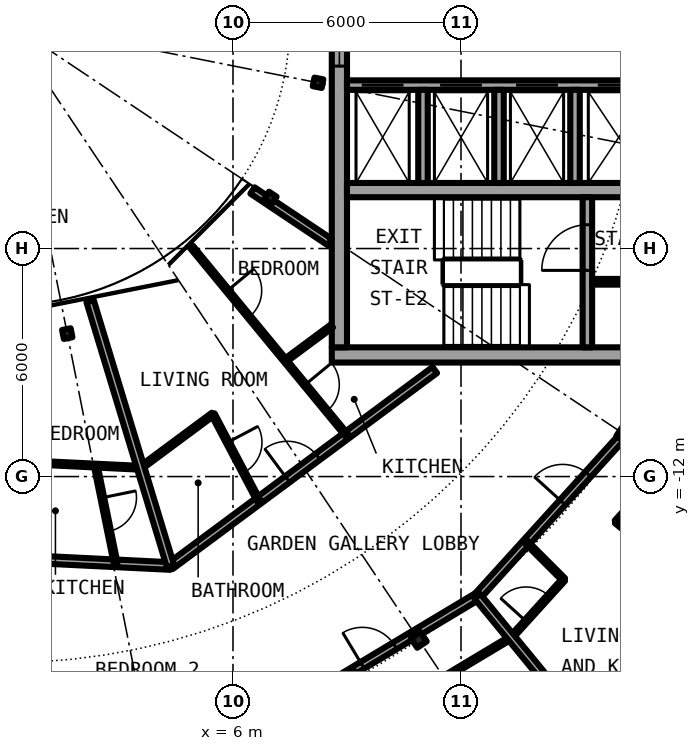
"""IFC4 building model, lengths in metres.
Left out: names, types, materials, properties, quantities, classifications, styles, units other than length and angle.
Written with IfcOpenShell. Run it as: python <this file> out.ifc"""

import sys

from ifc_helpers import new_model, si_unit, direction, frame, frame_2d, origin, origin_2d, place, context, subcontext, project, spatial, rectangle, i_section, extrude, element, fill, save


model = new_model("IFC4")
c1 = context("Model", 3, precision=1e-05, world=origin(), true_north=direction((0.0, 1.0)))
c2 = subcontext(c1, "Body", "Model", "MODEL_VIEW")
j1 = project(units=[si_unit("LENGTHUNIT", "METRE"), si_unit("PLANEANGLEUNIT", "RADIAN")], contexts=[c1])
p1 = place(None, origin())
s1 = spatial("IfcSite", under=j1, at=p1, CompositionType="ELEMENT")
p2 = place(p1, origin())
s2 = spatial("IfcBuilding", under=s1, at=p2, CompositionType="ELEMENT")
p3 = place(p2, frame((0.0, 0.0, 237.1)))
s3 = spatial("IfcBuildingStorey", under=s2, at=p3, CompositionType="ELEMENT", Elevation=237.1)
for number, where, z_axis, x_axis in (
    (1, (10.889, -16.297, 0.0), (0.0, 0.0, 1.0), (0.556, -0.831, 0.0)),
    (2, (16.297, -10.889, 0.0), (0.0, 0.0, 1.0), (0.831, -0.556, 0.0)),
):
    element("IfcColumn", number, at=place(p3, frame(where, z_axis=z_axis, x_axis=x_axis)), inside=s3, PredefinedType="COLUMN", context=c2, shape_type="SweptSolid", body=[
        extrude(i_section(OverallWidth=0.3, OverallDepth=0.3, WebThickness=0.011, FlangeThickness=0.019, FilletRadius=0.027, at=origin_2d()), origin(), (0.0, 0.0, 1.0), 3.05),
    ])
for number, where, z_axis, x_axis in (
    (3, (1.639, -8.239, 0.0), (0.0, 0.0, 1.0), (0.195, -0.981, 0.0)),
    (4, (6.984, -4.667, 0.0), (0.0, 0.0, 1.0), (0.831, -0.556, 0.0)),
    (5, (8.239, -1.639, 0.0), (0.0, 0.0, 1.0), (0.981, -0.195, 0.0)),
):
    element("IfcColumn", number, at=place(p3, frame(where, z_axis=z_axis, x_axis=x_axis)), inside=s3, PredefinedType="COLUMN", context=c2, shape_type="SweptSolid", body=[
        extrude(i_section(OverallWidth=0.24, OverallDepth=0.23, WebThickness=0.008, FlangeThickness=0.012, FilletRadius=0.021, at=origin_2d()), origin(), (0.0, 0.0, 1.0), 3.05),
    ])
p4 = place(p3, frame((8.6, -8.8, 0.0), z_axis=(0.0, 0.0, 1.0), x_axis=(1.0, 0.0, 0.0)))
e6 = element("IfcWall", 6, at=p4, inside=s3, PredefinedType="SHEAR", context=c2, shape_type="SweptSolid", body=[
    extrude(rectangle(XDim=13.4, YDim=0.4, at=frame_2d((6.7, 0.0))), origin(), (0.0, 0.0, 1.0), 3.05),
])
p5 = place(p4, frame((11.275, 0.0, 0.0)))
e7 = element("IfcOpeningElement", 7, at=p5, cuts=e6, PredefinedType="OPENING", context=c2, shape_type="SweptSolid", body=[
    extrude(rectangle(XDim=1.2, YDim=2.3, at=frame_2d((0.6, 1.15))), frame((0.0, 0.21, 0.0), z_axis=(0.0, -1.0, 0.0), x_axis=(1.0, 0.0, 0.0)), (0.0, 0.0, 1.0), 0.42),
])
p6 = place(p3, frame((8.8, -8.6, 0.0), z_axis=(0.0, 0.0, 1.0), x_axis=(0.0, 1.0, 0.0)))
e8 = element("IfcWall", 8, at=p6, inside=s3, PredefinedType="SHEAR", context=c2, shape_type="SweptSolid", body=[
    extrude(rectangle(XDim=17.2, YDim=0.4, at=frame_2d((8.6, 0.0))), origin(), (0.0, 0.0, 1.0), 3.05),
])
p7 = place(p6, frame((7.4, 0.0, 0.1)))
e9 = element("IfcOpeningElement", 9, at=p7, cuts=e8, PredefinedType="OPENING", context=c2, shape_type="SweptSolid", body=[
    extrude(rectangle(XDim=2.4, YDim=2.2, at=frame_2d((1.2, 1.1))), frame((0.0, 0.21, 0.0), z_axis=(0.0, -1.0, 0.0), x_axis=(1.0, 0.0, 0.0)), (0.0, 0.0, 1.0), 0.42),
])
p8 = place(p3, frame((19.15, -1.7, 0.0), z_axis=(0.0, 0.0, 1.0), x_axis=(-1.0, 0.0, 0.0)))
e10 = element("IfcWall", 10, at=p8, inside=s3, PredefinedType="SHEAR", context=c2, shape_type="SweptSolid", body=[
    extrude(rectangle(XDim=10.15, YDim=0.25, at=frame_2d((5.075, 0.0))), origin(), (0.0, 0.0, 1.0), 3.05),
])
p9 = place(p8, frame((8.663, 0.0, 0.0)))
e11 = element("IfcOpeningElement", 11, at=p9, cuts=e10, PredefinedType="OPENING", context=c2, shape_type="SweptSolid", body=[
    extrude(rectangle(XDim=1.1, YDim=2.3, at=frame_2d((0.55, 1.15))), frame((0.0, 0.135, 0.0), z_axis=(0.0, -1.0, 0.0), x_axis=(1.0, 0.0, 0.0)), (0.0, 0.0, 1.0), 0.27),
])
p10 = place(p8, frame((6.6, 0.0, 0.0)))
e12 = element("IfcOpeningElement", 12, at=p10, cuts=e10, PredefinedType="OPENING", context=c2, shape_type="SweptSolid", body=[
    extrude(rectangle(XDim=1.1, YDim=2.3, at=frame_2d((0.55, 1.15))), frame((0.0, 0.135, 0.0), z_axis=(0.0, -1.0, 0.0), x_axis=(1.0, 0.0, 0.0)), (0.0, 0.0, 1.0), 0.27),
])
p11 = place(p8, frame((4.6, 0.0, 0.0)))
e13 = element("IfcOpeningElement", 13, at=p11, cuts=e10, PredefinedType="OPENING", context=c2, shape_type="SweptSolid", body=[
    extrude(rectangle(XDim=1.1, YDim=2.3, at=frame_2d((0.55, 1.15))), frame((0.0, 0.135, 0.0), z_axis=(0.0, -1.0, 0.0), x_axis=(1.0, 0.0, 0.0)), (0.0, 0.0, 1.0), 0.27),
])
p12 = place(p8, frame((2.45, 0.0, 0.0)))
e14 = element("IfcOpeningElement", 14, at=p12, cuts=e10, PredefinedType="OPENING", context=c2, shape_type="SweptSolid", body=[
    extrude(rectangle(XDim=1.1, YDim=2.3, at=frame_2d((0.55, 1.15))), frame((0.0, 0.135, 0.0), z_axis=(0.0, -1.0, 0.0), x_axis=(1.0, 0.0, 0.0)), (0.0, 0.0, 1.0), 0.27),
])
p13 = place(p8, frame((0.413, 0.0, 0.0)))
e15 = element("IfcOpeningElement", 15, at=p13, cuts=e10, PredefinedType="OPENING", context=c2, shape_type="SweptSolid", body=[
    extrude(rectangle(XDim=0.9, YDim=2.3, at=frame_2d((0.45, 1.15))), frame((0.0, 0.135, 0.0), z_axis=(0.0, -1.0, 0.0), x_axis=(1.0, 0.0, 0.0)), (0.0, 0.0, 1.0), 0.27),
])
p14 = place(p3, frame((9.0, -4.462, 0.0), z_axis=(0.0, 0.0, 1.0), x_axis=(1.0, 0.0, 0.0)))
e16 = element("IfcWall", 16, at=p14, inside=s3, PredefinedType="SHEAR", context=c2, shape_type="SweptSolid", body=[
    extrude(rectangle(XDim=10.15, YDim=0.375, at=frame_2d((5.075, 0.0))), origin(), (0.0, 0.0, 1.0), 3.05),
])
p15 = place(p3, frame((15.325, -8.6, 0.0), z_axis=(0.0, 0.0, 1.0), x_axis=(0.0, 1.0, 0.0)))
e17 = element("IfcWall", 17, at=p15, inside=s3, PredefinedType="SHEAR", context=c2, shape_type="SweptSolid", body=[
    extrude(rectangle(XDim=3.95, YDim=0.25, at=frame_2d((1.975, 0.0))), origin(), (0.0, 0.0, 1.0), 3.05),
])
p16 = place(p15, frame((2.025, 0.0, 0.0)))
e18 = element("IfcOpeningElement", 18, at=p16, cuts=e17, PredefinedType="OPENING", context=c2, shape_type="SweptSolid", body=[
    extrude(rectangle(XDim=1.2, YDim=2.3, at=frame_2d((0.6, 1.15))), frame((0.0, 0.135, 0.0), z_axis=(0.0, -1.0, 0.0), x_axis=(1.0, 0.0, 0.0)), (0.0, 0.0, 1.0), 0.27),
])
for number, where, z_axis, x_axis in (
    (19, (15.0, -1.825, 0.0), (0.0, 0.0, 1.0), (0.0, -1.0, 0.0)),
    (20, (11.0, -1.825, 0.0), (0.0, 0.0, 1.0), (0.0, -1.0, 0.0)),
    (21, (13.0, -1.825, 0.0), (0.0, 0.0, 1.0), (0.0, -1.0, 0.0)),
):
    element("IfcWall", number, at=place(p3, frame(where, z_axis=z_axis, x_axis=x_axis)), inside=s3, PredefinedType="SOLIDWALL", context=c2, shape_type="SweptSolid", body=[
        extrude(rectangle(XDim=2.45, YDim=0.25, at=frame_2d((1.225, 0.0))), origin(), (0.0, 0.0, 1.0), 2.7),
    ])
p17 = place(p3, frame((15.45, -6.875, 0.0), z_axis=(0.0, 0.0, 1.0), x_axis=(1.0, 0.0, 0.0)))
e22 = element("IfcWall", 22, at=p17, inside=s3, PredefinedType="PARTITIONING", context=c2, shape_type="SweptSolid", body=[
    extrude(rectangle(XDim=3.7, YDim=0.15, at=frame_2d((1.85, 0.0))), origin(), (0.0, 0.0, 1.0), 2.7),
])
p18 = place(p17, frame((1.4, 0.0, 0.0)))
e23 = element("IfcOpeningElement", 23, at=p18, cuts=e22, PredefinedType="OPENING", context=c2, shape_type="SweptSolid", body=[
    extrude(rectangle(XDim=0.9, YDim=2.3, at=frame_2d((0.45, 1.15))), frame((0.0, 0.085, 0.0), z_axis=(0.0, -1.0, 0.0), x_axis=(1.0, 0.0, 0.0)), (0.0, 0.0, 1.0), 0.17),
])
p19 = place(p3, frame((11.56, -17.289, 0.0), z_axis=(0.0, 0.0, 1.0), x_axis=(0.857713062192, 0.514128683254, 0.0)))
e24 = element("IfcWall", 24, at=p19, inside=s3, PredefinedType="PARTITIONING", context=c2, shape_type="SweptSolid", body=[
    extrude(rectangle(XDim=2.054, YDim=0.1, at=frame_2d((1.027, 0.0))), origin(), (0.0, 0.0, 1.0), 2.7),
])
p20 = place(p3, frame((13.322, -16.233, 0.0), z_axis=(0.0, 0.0, 1.0), x_axis=(0.671678456097, 0.74084279818, 0.0)))
e25 = element("IfcWall", 25, at=p20, inside=s3, PredefinedType="PARTITIONING", context=c2, shape_type="SweptSolid", body=[
    extrude(rectangle(XDim=2.054, YDim=0.1, at=frame_2d((1.027, 0.0))), origin(), (0.0, 0.0, 1.0), 2.7),
])
p21 = place(p20, frame((0.577, 0.0, 0.0)))
e26 = element("IfcOpeningElement", 26, at=p21, cuts=e25, PredefinedType="OPENING", context=c2, shape_type="SweptSolid", body=[
    extrude(rectangle(XDim=0.9, YDim=2.3, at=frame_2d((0.45, 1.15))), frame((0.0, 0.06, 0.0), z_axis=(0.0, -1.0, 0.0), x_axis=(1.0, 0.0, 0.0)), (0.0, 0.0, 1.0), 0.12),
])
p22 = place(p3, frame((16.082, -13.189, 0.0), z_axis=(0.0, 0.0, 1.0), x_axis=(0.671678456097, 0.74084279818, 0.0)))
e27 = element("IfcWall", 27, at=p22, inside=s3, PredefinedType="PARTITIONING", context=c2, shape_type="SweptSolid", body=[
    extrude(rectangle(XDim=2.054, YDim=0.1, at=frame_2d((1.027, 0.0))), origin(), (0.0, 0.0, 1.0), 2.7),
])
p23 = place(p3, frame((7.495, -18.111, 0.0), z_axis=(0.0, 0.0, 1.0), x_axis=(0.85773600187, 0.514090411403, 0.0)))
e28 = element("IfcWall", 28, at=p23, inside=s3, PredefinedType="PARTITIONING", context=c2, shape_type="SweptSolid", body=[
    extrude(rectangle(XDim=5.758, YDim=0.2, at=frame_2d((2.879, 0.0))), origin(), (0.0, 0.0, 1.0), 2.45),
])
p24 = place(p23, frame((2.224, 0.0, 0.0)))
e29 = element("IfcOpeningElement", 29, at=p24, cuts=e28, PredefinedType="OPENING", context=c2, shape_type="SweptSolid", body=[
    extrude(rectangle(XDim=1.0, YDim=2.3, at=frame_2d((0.5, 1.15))), frame((0.0, 0.11, 0.0), z_axis=(0.0, -1.0, 0.0), x_axis=(1.0, 0.0, 0.0)), (0.0, 0.0, 1.0), 0.22),
])
p25 = place(p3, frame((12.434, -15.151, 0.0), z_axis=(0.0, 0.0, 1.0), x_axis=(0.671619657805, 0.740896102871, 0.0)))
e30 = element("IfcWall", 30, at=p25, inside=s3, PredefinedType="PARTITIONING", context=c2, shape_type="SweptSolid", body=[
    extrude(rectangle(XDim=5.6, YDim=0.2, at=frame_2d((2.8, 0.0))), origin(), (0.0, 0.0, 1.0), 2.45),
])
p26 = place(p25, frame((3.335, 0.0, 0.0)))
e31 = element("IfcOpeningElement", 31, at=p26, cuts=e30, PredefinedType="OPENING", context=c2, shape_type="SweptSolid", body=[
    extrude(rectangle(XDim=1.0, YDim=2.3, at=frame_2d((0.5, 1.15))), frame((0.0, 0.11, 0.0), z_axis=(0.0, -1.0, 0.0), x_axis=(1.0, 0.0, 0.0)), (0.0, 0.0, 1.0), 0.22),
])
p27 = place(p3, frame((-5.737, -13.859, 0.0), z_axis=(0.0, 0.0, 1.0), x_axis=(0.998799182242, -0.048991770265, 0.0)))
e32 = element("IfcWall", 32, at=p27, inside=s3, PredefinedType="PARTITIONING", context=c2, shape_type="SweptSolid", body=[
    extrude(rectangle(XDim=10.106, YDim=0.2, at=frame_2d((5.053, 0.0))), origin(), (0.0, 0.0, 1.0), 2.7),
])
p28 = place(p27, frame((3.828, 0.0, 0.0)))
e33 = element("IfcOpeningElement", 33, at=p28, cuts=e32, PredefinedType="OPENING", context=c2, shape_type="SweptSolid", body=[
    extrude(rectangle(XDim=1.0, YDim=2.3, at=frame_2d((0.5, 1.15))), frame((0.0, 0.11, 0.0), z_axis=(0.0, -1.0, 0.0), x_axis=(1.0, 0.0, 0.0)), (0.0, 0.0, 1.0), 0.22),
])
p29 = place(p3, frame((4.354, -14.354, 0.0), z_axis=(0.0, 0.0, 1.0), x_axis=(0.80331688802, 0.595551825974, 0.0)))
e34 = element("IfcWall", 34, at=p29, inside=s3, PredefinedType="PARTITIONING", context=c2, shape_type="SweptSolid", body=[
    extrude(rectangle(XDim=8.659, YDim=0.2, at=frame_2d((4.33, 0.0))), origin(), (0.0, 0.0, 1.0), 2.7),
])
p30 = place(p29, frame((3.832, 0.0, 0.0)))
e35 = element("IfcOpeningElement", 35, at=p30, cuts=e34, PredefinedType="OPENING", context=c2, shape_type="SweptSolid", body=[
    extrude(rectangle(XDim=1.0, YDim=2.3, at=frame_2d((0.5, 1.15))), frame((0.0, 0.11, 0.0), z_axis=(0.0, -1.0, 0.0), x_axis=(1.0, 0.0, 0.0)), (0.0, 0.0, 1.0), 0.22),
])
p31 = place(p3, frame((0.023, -11.596, 0.0), z_axis=(0.0, 0.0, 1.0), x_axis=(0.998798689193, -0.049001821055, 0.0)))
e36 = element("IfcWall", 36, at=p31, inside=s3, PredefinedType="PARTITIONING", context=c2, shape_type="SweptSolid", body=[
    extrude(rectangle(XDim=3.552, YDim=0.1, at=frame_2d((1.776, 0.0))), origin(), (0.0, 0.0, 1.0), 2.7),
])
p32 = place(p3, frame((3.571, -11.77, 0.0), z_axis=(0.0, 0.0, 1.0), x_axis=(0.803182415278, 0.59573316828, 0.0)))
e37 = element("IfcWall", 37, at=p32, inside=s3, PredefinedType="PARTITIONING", context=c2, shape_type="SweptSolid", body=[
    extrude(rectangle(XDim=2.367, YDim=0.1, at=frame_2d((1.183, 0.0))), origin(), (0.0, 0.0, 1.0), 2.7),
])
p33 = place(p3, frame((7.376, -8.948, 0.0), z_axis=(0.0, 0.0, 1.0), x_axis=(0.80332760487, 0.595537370157, 0.0)))
e38 = element("IfcWall", 38, at=p33, inside=s3, PredefinedType="PARTITIONING", context=c2, shape_type="SweptSolid", body=[
    extrude(rectangle(XDim=1.526, YDim=0.1, at=frame_2d((0.763, 0.0))), origin(), (0.0, 0.0, 1.0), 2.7),
])
p34 = place(p3, frame((6.513, -4.472, 0.0), z_axis=(0.0, 0.0, 1.0), x_axis=(0.831450132577, -0.555599385382, 0.0)))
e39 = element("IfcWall", 39, at=p34, inside=s3, PredefinedType="PARTITIONING", context=c2, shape_type="SweptSolid", body=[
    extrude(rectangle(XDim=2.443, YDim=0.2, at=frame_2d((1.221, 0.0))), origin(), (0.0, 0.0, 1.0), 2.7),
])
p35 = place(p3, frame((2.241, -7.388, 0.0), z_axis=(0.0, 0.0, 1.0), x_axis=(0.29039551313, -0.956906707027, 0.0)))
e40 = element("IfcWall", 40, at=p35, inside=s3, PredefinedType="PARTITIONING", context=c2, shape_type="SweptSolid", body=[
    extrude(rectangle(XDim=7.28, YDim=0.2, at=frame_2d((3.64, 0.0))), origin(), (0.0, 0.0, 1.0), 2.7),
])
p36 = place(p3, frame((2.388, -11.712, 0.0), z_axis=(0.0, 0.0, 1.0), x_axis=(0.19976495468, -0.979843846172, 0.0)))
e41 = element("IfcWall", 41, at=p36, inside=s3, PredefinedType="PARTITIONING", context=c2, shape_type="SweptSolid", body=[
    extrude(rectangle(XDim=2.624, YDim=0.1, at=frame_2d((1.312, 0.0))), origin(), (0.0, 0.0, 1.0), 2.7),
])
p37 = place(p36, frame((0.862, 0.0, 0.0)))
e42 = element("IfcOpeningElement", 42, at=p37, cuts=e41, PredefinedType="OPENING", context=c2, shape_type="SweptSolid", body=[
    extrude(rectangle(XDim=0.9, YDim=2.3, at=frame_2d((0.45, 1.15))), frame((0.0, 0.06, 0.0), z_axis=(0.0, -1.0, 0.0), x_axis=(1.0, 0.0, 0.0)), (0.0, 0.0, 1.0), 0.12),
])
p38 = place(p3, frame((4.909, -5.958, 0.0), z_axis=(0.0, 0.0, 1.0), x_axis=(0.635941750694, -0.771737059965, 0.0)))
e43 = element("IfcWall", 43, at=p38, inside=s3, PredefinedType="PARTITIONING", context=c2, shape_type="SweptSolid", body=[
    extrude(rectangle(XDim=6.422, YDim=0.1, at=frame_2d((3.211, 0.0))), origin(), (0.0, 0.0, 1.0), 2.7),
])
p39 = place(p38, frame((4.699, 0.0, 0.0)))
e44 = element("IfcOpeningElement", 44, at=p39, cuts=e43, PredefinedType="OPENING", context=c2, shape_type="SweptSolid", body=[
    extrude(rectangle(XDim=0.9, YDim=2.3, at=frame_2d((0.45, 1.15))), frame((0.0, 0.06, 0.0), z_axis=(0.0, -1.0, 0.0), x_axis=(1.0, 0.0, 0.0)), (0.0, 0.0, 1.0), 0.12),
])
p40 = place(p38, frame((1.488, 0.0, 0.0)))
e45 = element("IfcOpeningElement", 45, at=p40, cuts=e43, PredefinedType="OPENING", context=c2, shape_type="SweptSolid", body=[
    extrude(rectangle(XDim=0.9, YDim=2.3, at=frame_2d((0.45, 1.15))), frame((0.0, 0.06, 0.0), z_axis=(0.0, -1.0, 0.0), x_axis=(1.0, 0.0, 0.0)), (0.0, 0.0, 1.0), 0.12),
])
p41 = place(p3, frame((5.472, -10.36, 0.0), z_axis=(0.0, 0.0, 1.0), x_axis=(0.467373035141, -0.884060204976, 0.0)))
e46 = element("IfcWall", 46, at=p41, inside=s3, PredefinedType="PARTITIONING", context=c2, shape_type="SweptSolid", body=[
    extrude(rectangle(XDim=2.572, YDim=0.1, at=frame_2d((1.286, 0.0))), origin(), (0.0, 0.0, 1.0), 2.7),
])
p42 = place(p41, frame((0.836, 0.0, 0.0)))
e47 = element("IfcOpeningElement", 47, at=p42, cuts=e46, PredefinedType="OPENING", context=c2, shape_type="SweptSolid", body=[
    extrude(rectangle(XDim=0.9, YDim=2.3, at=frame_2d((0.45, 1.15))), frame((0.0, 0.06, 0.0), z_axis=(0.0, -1.0, 0.0), x_axis=(1.0, 0.0, 0.0)), (0.0, 0.0, 1.0), 0.12),
])
p43 = place(p3, frame((9.14, -17.124, 0.0), z_axis=(0.0, 0.0, 1.0), x_axis=(0.471072596947, -0.882094444153, 0.0)))
e48 = element("IfcWall", 48, at=p43, inside=s3, PredefinedType="PARTITIONING", context=c2, shape_type="SweptSolid", body=[
    extrude(rectangle(XDim=1.386, YDim=0.1, at=frame_2d((0.693, 0.0))), origin(), (0.0, 0.0, 1.0), 2.7),
])
p44 = place(p3, frame((12.432, -15.153, 0.0), z_axis=(0.0, 0.0, 1.0), x_axis=(0.634356436091, -0.773040692324, 0.0)))
e49 = element("IfcWall", 49, at=p44, inside=s3, PredefinedType="PARTITIONING", context=c2, shape_type="SweptSolid", body=[
    extrude(rectangle(XDim=6.2, YDim=0.2, at=frame_2d((3.1, 0.0))), origin(), (0.0, 0.0, 1.0), 2.7),
])
p45 = place(p3, frame((13.722, -13.73, 0.0), z_axis=(0.0, 0.0, 1.0), x_axis=(0.707458838269, -0.706754548733, 0.0)))
e50 = element("IfcWall", 50, at=p45, inside=s3, PredefinedType="PARTITIONING", context=c2, shape_type="SweptSolid", body=[
    extrude(rectangle(XDim=1.386, YDim=0.1, at=frame_2d((0.693, 0.0))), origin(), (0.0, 0.0, 1.0), 2.7),
])
p46 = place(p3, frame((16.081, -13.189, 0.0), z_axis=(0.0, 0.0, 1.0), x_axis=(0.773226150619, -0.634130365145, 0.0)))
e51 = element("IfcWall", 51, at=p46, inside=s3, PredefinedType="PARTITIONING", context=c2, shape_type="SweptSolid", body=[
    extrude(rectangle(XDim=5.002, YDim=0.1, at=frame_2d((2.501, 0.0))), origin(), (0.0, 0.0, 1.0), 2.7),
])
p47 = place(p46, frame((2.051, 0.0, 0.0)))
e52 = element("IfcOpeningElement", 52, at=p47, cuts=e51, PredefinedType="OPENING", context=c2, shape_type="SweptSolid", body=[
    extrude(rectangle(XDim=0.9, YDim=2.3, at=frame_2d((0.45, 1.15))), frame((0.0, 0.06, 0.0), z_axis=(0.0, -1.0, 0.0), x_axis=(1.0, 0.0, 0.0)), (0.0, 0.0, 1.0), 0.12),
])
p48 = place(p9, origin())
e53 = element("IfcDoor", 53, at=p48, inside=s3, OperationType="DOUBLE_DOOR_SLIDING", PredefinedType="DOOR", context=c2, shape_type="SweptSolid", body=[
    extrude(rectangle(XDim=1.1, YDim=2.3, at=frame_2d((0.55, 1.15))), frame((0.0, 0.025, 0.0), z_axis=(0.0, -1.0, 0.0), x_axis=(1.0, 0.0, 0.0)), (0.0, 0.0, 1.0), 0.05),
])
fill(e11, e53)
p49 = place(p10, origin())
e54 = element("IfcDoor", 54, at=p49, inside=s3, OperationType="DOUBLE_DOOR_SLIDING", PredefinedType="DOOR", context=c2, shape_type="SweptSolid", body=[
    extrude(rectangle(XDim=1.1, YDim=2.3, at=frame_2d((0.55, 1.15))), frame((0.0, 0.025, 0.0), z_axis=(0.0, -1.0, 0.0), x_axis=(1.0, 0.0, 0.0)), (0.0, 0.0, 1.0), 0.05),
])
fill(e12, e54)
p50 = place(p11, origin())
e55 = element("IfcDoor", 55, at=p50, inside=s3, OperationType="DOUBLE_DOOR_SLIDING", PredefinedType="DOOR", context=c2, shape_type="SweptSolid", body=[
    extrude(rectangle(XDim=1.1, YDim=2.3, at=frame_2d((0.55, 1.15))), frame((0.0, 0.025, 0.0), z_axis=(0.0, -1.0, 0.0), x_axis=(1.0, 0.0, 0.0)), (0.0, 0.0, 1.0), 0.05),
])
fill(e13, e55)
p51 = place(p12, origin())
e56 = element("IfcDoor", 56, at=p51, inside=s3, OperationType="DOUBLE_DOOR_SLIDING", PredefinedType="DOOR", context=c2, shape_type="SweptSolid", body=[
    extrude(rectangle(XDim=1.1, YDim=2.3, at=frame_2d((0.55, 1.15))), frame((0.0, 0.025, 0.0), z_axis=(0.0, -1.0, 0.0), x_axis=(1.0, 0.0, 0.0)), (0.0, 0.0, 1.0), 0.05),
])
fill(e14, e56)
p52 = place(p16, origin())
e57 = element("IfcDoor", 57, at=p52, inside=s3, OperationType="SINGLE_SWING_LEFT", PredefinedType="DOOR", context=c2, shape_type="SweptSolid", body=[
    extrude(rectangle(XDim=1.2, YDim=2.3, at=frame_2d((0.6, 1.15))), frame((0.0, 0.025, 0.0), z_axis=(0.0, -1.0, 0.0), x_axis=(1.0, 0.0, 0.0)), (0.0, 0.0, 1.0), 0.05),
])
fill(e18, e57)
p53 = place(p7, origin())
e58 = element("IfcWindow", 58, at=p53, inside=s3, PartitioningType="SINGLE_PANEL", PredefinedType="WINDOW", context=c2, shape_type="SweptSolid", body=[
    extrude(rectangle(XDim=2.4, YDim=2.2, at=frame_2d((1.2, 1.1))), frame((0.0, 0.03, 0.0), z_axis=(0.0, -1.0, 0.0), x_axis=(1.0, 0.0, 0.0)), (0.0, 0.0, 1.0), 0.06),
])
fill(e9, e58)
p54 = place(p24, origin())
e59 = element("IfcDoor", 59, at=p54, inside=s3, OperationType="SINGLE_SWING_LEFT", PredefinedType="DOOR", context=c2, shape_type="SweptSolid", body=[
    extrude(rectangle(XDim=1.0, YDim=2.3, at=frame_2d((0.5, 1.15))), frame((0.0, 0.025, 0.0), z_axis=(0.0, -1.0, 0.0), x_axis=(1.0, 0.0, 0.0)), (0.0, 0.0, 1.0), 0.05),
])
fill(e29, e59)
p55 = place(p26, origin())
e60 = element("IfcDoor", 60, at=p55, inside=s3, OperationType="SINGLE_SWING_RIGHT", PredefinedType="DOOR", context=c2, shape_type="SweptSolid", body=[
    extrude(rectangle(XDim=1.0, YDim=2.3, at=frame_2d((0.5, 1.15))), frame((0.0, 0.025, 0.0), z_axis=(0.0, -1.0, 0.0), x_axis=(1.0, 0.0, 0.0)), (0.0, 0.0, 1.0), 0.05),
])
fill(e31, e60)
p56 = place(p21, origin())
e61 = element("IfcDoor", 61, at=p56, inside=s3, OperationType="SINGLE_SWING_LEFT", PredefinedType="DOOR", context=c2, shape_type="SweptSolid", body=[
    extrude(rectangle(XDim=0.9, YDim=2.3, at=frame_2d((0.45, 1.15))), frame((0.0, 0.025, 0.0), z_axis=(0.0, -1.0, 0.0), x_axis=(1.0, 0.0, 0.0)), (0.0, 0.0, 1.0), 0.05),
])
fill(e26, e61)
p57 = place(p37, origin())
e62 = element("IfcDoor", 62, at=p57, inside=s3, OperationType="SINGLE_SWING_RIGHT", PredefinedType="DOOR", context=c2, shape_type="SweptSolid", body=[
    extrude(rectangle(XDim=0.9, YDim=2.3, at=frame_2d((0.45, 1.15))), frame((0.0, 0.025, 0.0), z_axis=(0.0, -1.0, 0.0), x_axis=(1.0, 0.0, 0.0)), (0.0, 0.0, 1.0), 0.05),
])
fill(e42, e62)
p58 = place(p30, origin())
e63 = element("IfcDoor", 63, at=p58, inside=s3, OperationType="SINGLE_SWING_RIGHT", PredefinedType="DOOR", context=c2, shape_type="SweptSolid", body=[
    extrude(rectangle(XDim=1.0, YDim=2.3, at=frame_2d((0.5, 1.15))), frame((0.0, 0.025, 0.0), z_axis=(0.0, -1.0, 0.0), x_axis=(1.0, 0.0, 0.0)), (0.0, 0.0, 1.0), 0.05),
])
fill(e35, e63)
p59 = place(p42, origin())
e64 = element("IfcDoor", 64, at=p59, inside=s3, OperationType="SINGLE_SWING_LEFT", PredefinedType="DOOR", context=c2, shape_type="SweptSolid", body=[
    extrude(rectangle(XDim=0.9, YDim=2.3, at=frame_2d((0.45, 1.15))), frame((0.0, 0.025, 0.0), z_axis=(0.0, -1.0, 0.0), x_axis=(1.0, 0.0, 0.0)), (0.0, 0.0, 1.0), 0.05),
])
fill(e47, e64)
p60 = place(p39, origin())
e65 = element("IfcDoor", 65, at=p60, inside=s3, OperationType="SINGLE_SWING_RIGHT", PredefinedType="DOOR", context=c2, shape_type="SweptSolid", body=[
    extrude(rectangle(XDim=0.9, YDim=2.3, at=frame_2d((0.45, 1.15))), frame((0.0, 0.025, 0.0), z_axis=(0.0, -1.0, 0.0), x_axis=(1.0, 0.0, 0.0)), (0.0, 0.0, 1.0), 0.05),
])
fill(e44, e65)
p61 = place(p40, origin())
e66 = element("IfcDoor", 66, at=p61, inside=s3, OperationType="SINGLE_SWING_LEFT", PredefinedType="DOOR", context=c2, shape_type="SweptSolid", body=[
    extrude(rectangle(XDim=0.9, YDim=2.3, at=frame_2d((0.45, 1.15))), frame((0.0, 0.025, 0.0), z_axis=(0.0, -1.0, 0.0), x_axis=(1.0, 0.0, 0.0)), (0.0, 0.0, 1.0), 0.05),
])
fill(e45, e66)
save(model, sys.argv[1])
